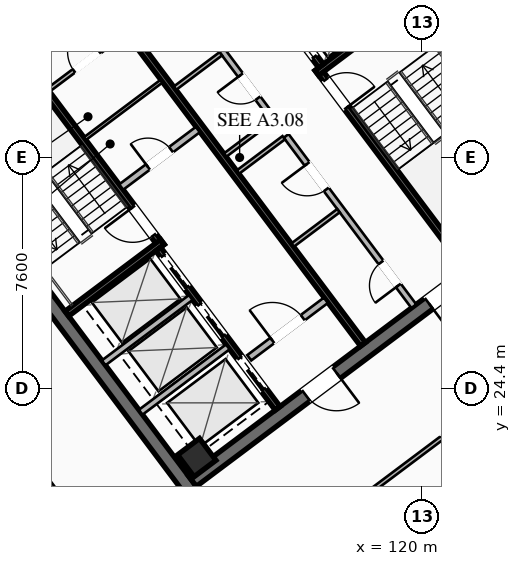
"""IFC4 building model, lengths in metres.
Left out: names, types, materials, properties, quantities, classifications, styles, units other than length and angle.
Written with IfcOpenShell. Run it as: python <this file> out.ifc"""

import sys

from ifc_helpers import new_model, si_unit, direction, frame, frame_2d, origin, origin_2d, place, context, subcontext, project, spatial, rectangle, hollow_rectangle, extrude, element, fill, save


model = new_model("IFC4")
c1 = context("Model", 3, precision=1e-05, world=origin(), true_north=direction((0.0, 1.0)))
c2 = subcontext(c1, "Body", "Model", "MODEL_VIEW")
j1 = project(units=[si_unit("LENGTHUNIT", "METRE"), si_unit("PLANEANGLEUNIT", "RADIAN")], contexts=[c1])
p1 = place(None, origin())
s1 = spatial("IfcSite", under=j1, at=p1, CompositionType="ELEMENT")
p2 = place(p1, origin())
s2 = spatial("IfcBuilding", under=s1, at=p2, CompositionType="ELEMENT")
p3 = place(p2, frame((0.0, 0.0, 229.05)))
s3 = spatial("IfcBuildingStorey", under=s2, at=p3, CompositionType="ELEMENT", Elevation=229.05)
for number, where, z_axis, x_axis in (
    (1, (112.396, 21.047, 0.0), (0.0, 0.0, 1.0), (-0.6, 0.8, 0.0)),
    (2, (115.604, 42.953, 0.0), (0.0, 0.0, 1.0), (0.6, -0.8, 0.0)),
):
    element("IfcWall", number, at=place(p3, frame(where, z_axis=z_axis, x_axis=x_axis)), inside=s3, PredefinedType="SHEAR", context=c2, shape_type="SweptSolid", body=[
        extrude(rectangle(XDim=15.6, YDim=0.45, at=frame_2d((7.8, 0.0))), origin(), (0.0, 0.0, 1.0), 3.55),
    ])
p4 = place(p3, frame((124.649, 30.518, 0.0), z_axis=(0.0, 0.0, 1.0), x_axis=(-0.8, -0.6, 0.0)))
e3 = element("IfcWall", 3, at=p4, inside=s3, PredefinedType="SHEAR", context=c2, shape_type="SweptSolid", body=[
    extrude(rectangle(XDim=15.26, YDim=0.45, at=frame_2d((7.63, 0.0))), origin(), (0.0, 0.0, 1.0), 3.55),
])
p5 = place(p4, frame((9.33, 0.0, 0.0)))
e4 = element("IfcOpeningElement", 4, at=p5, cuts=e3, PredefinedType="OPENING", context=c2, shape_type="SweptSolid", body=[
    extrude(rectangle(XDim=1.25, YDim=2.25, at=frame_2d((0.625, 1.125))), frame((0.0, 0.235, 0.0), z_axis=(0.0, -1.0, 0.0), x_axis=(1.0, 0.0, 0.0)), (0.0, 0.0, 1.0), 0.47),
])
p6 = place(p4, frame((4.28, 0.0, 0.0)))
e5 = element("IfcOpeningElement", 5, at=p6, cuts=e3, PredefinedType="OPENING", context=c2, shape_type="SweptSolid", body=[
    extrude(rectangle(XDim=1.25, YDim=2.25, at=frame_2d((0.625, 1.125))), frame((0.0, 0.235, 0.0), z_axis=(0.0, -1.0, 0.0), x_axis=(1.0, 0.0, 0.0)), (0.0, 0.0, 1.0), 0.47),
])
p7 = place(p3, frame((103.351, 33.482, 0.0), z_axis=(0.0, 0.0, 1.0), x_axis=(0.8, 0.6, 0.0)))
e6 = element("IfcWall", 6, at=p7, inside=s3, PredefinedType="SHEAR", context=c2, shape_type="SweptSolid", body=[
    extrude(rectangle(XDim=15.26, YDim=0.45, at=frame_2d((7.63, 0.0))), origin(), (0.0, 0.0, 1.0), 3.55),
])
p8 = place(p7, frame((4.68, 0.0, 0.0)))
e7 = element("IfcOpeningElement", 7, at=p8, cuts=e6, PredefinedType="OPENING", context=c2, shape_type="SweptSolid", body=[
    extrude(rectangle(XDim=1.25, YDim=2.25, at=frame_2d((0.625, 1.125))), frame((0.0, 0.235, 0.0), z_axis=(0.0, -1.0, 0.0), x_axis=(1.0, 0.0, 0.0)), (0.0, 0.0, 1.0), 0.47),
])
p9 = place(p7, frame((9.73, 0.0, 0.0)))
e8 = element("IfcOpeningElement", 8, at=p9, cuts=e6, PredefinedType="OPENING", context=c2, shape_type="SweptSolid", body=[
    extrude(rectangle(XDim=1.25, YDim=2.25, at=frame_2d((0.625, 1.125))), frame((0.0, 0.235, 0.0), z_axis=(0.0, -1.0, 0.0), x_axis=(1.0, 0.0, 0.0)), (0.0, 0.0, 1.0), 0.47),
])
p10 = place(p3, frame((112.59, 22.13, 0.0), z_axis=(0.0, 0.0, 1.0), x_axis=(0.799999996291, 0.600000004945, 0.0)))
e9 = element("IfcColumn", 9, at=p10, inside=s3, PredefinedType="COLUMN", context=c2, shape_type="SweptSolid", body=[
    extrude(hollow_rectangle(XDim=0.9, YDim=0.9, WallThickness=0.04, at=origin_2d()), origin(), (0.0, 0.0, 1.0), 3.37),
])
p11 = place(p3, frame((111.44, 29.08, 0.0), z_axis=(0.0, 0.0, 1.0), x_axis=(-0.59999041401, 0.800007189403, 0.0)))
e10 = element("IfcWall", 10, at=p11, inside=s3, PredefinedType="SHEAR", context=c2, shape_type="SweptSolid", body=[
    extrude(rectangle(XDim=8.15, YDim=0.2, at=frame_2d((4.075, 0.0))), origin(), (0.0, 0.0, 1.0), 3.37),
])
p12 = place(p11, frame((0.45, 0.0, 0.0)))
e11 = element("IfcOpeningElement", 11, at=p12, cuts=e10, PredefinedType="OPENING", context=c2, shape_type="SweptSolid", body=[
    extrude(rectangle(XDim=1.15, YDim=2.2, at=frame_2d((0.575, 1.1))), frame((0.0, 0.11, 0.0), z_axis=(0.0, -1.0, 0.0), x_axis=(1.0, 0.0, 0.0)), (0.0, 0.0, 1.0), 0.22),
])
p13 = place(p3, frame((108.316, 26.862, 0.0), z_axis=(0.0, 0.0, 1.0), x_axis=(0.800014909178, 0.599980120581, 0.0)))
e12 = element("IfcWall", 12, at=p13, inside=s3, PredefinedType="SHEAR", context=c2, shape_type="SweptSolid", body=[
    extrude(rectangle(XDim=3.93, YDim=0.2, at=frame_2d((1.965, 0.0))), origin(), (0.0, 0.0, 1.0), 3.37),
])
p14 = place(p3, frame((116.56, 34.92, 0.0), z_axis=(0.0, 0.0, 1.0), x_axis=(0.59999041401, -0.800007189403, 0.0)))
e13 = element("IfcWall", 13, at=p14, inside=s3, PredefinedType="SHEAR", context=c2, shape_type="SweptSolid", body=[
    extrude(rectangle(XDim=8.15, YDim=0.2, at=frame_2d((4.075, 0.0))), origin(), (0.0, 0.0, 1.0), 3.37),
])
p15 = place(p14, frame((0.45, 0.0, 0.0)))
e14 = element("IfcOpeningElement", 14, at=p15, cuts=e13, PredefinedType="OPENING", context=c2, shape_type="SweptSolid", body=[
    extrude(rectangle(XDim=1.15, YDim=2.2, at=frame_2d((0.575, 1.1))), frame((0.0, 0.11, 0.0), z_axis=(0.0, -1.0, 0.0), x_axis=(1.0, 0.0, 0.0)), (0.0, 0.0, 1.0), 0.22),
])
p16 = place(p3, frame((116.54, 34.78, 0.0), z_axis=(0.0, 0.0, 1.0), x_axis=(0.800014909178, 0.599980120581, 0.0)))
e15 = element("IfcWall", 15, at=p16, inside=s3, PredefinedType="SHEAR", context=c2, shape_type="SweptSolid", body=[
    extrude(rectangle(XDim=3.93, YDim=0.2, at=frame_2d((1.965, 0.0))), origin(), (0.0, 0.0, 1.0), 3.37),
])
p17 = place(p3, frame((118.058, 25.856, 0.0), z_axis=(0.0, 0.0, 1.0), x_axis=(-0.600002657301, 0.799998007018, 0.0)))
e16 = element("IfcWall", 16, at=p17, inside=s3, PredefinedType="SHEAR", context=c2, shape_type="SweptSolid", body=[
    extrude(rectangle(XDim=14.7, YDim=0.2, at=frame_2d((7.35, 0.0))), origin(), (0.0, 0.0, 1.0), 3.37),
])
p18 = place(p3, frame((110.104, 31.028, 0.0), z_axis=(0.0, 0.0, 1.0), x_axis=(0.800018601094, 0.59997519774, 0.0)))
e17 = element("IfcWall", 17, at=p18, inside=s3, PredefinedType="SOLIDWALL", context=c2, shape_type="SweptSolid", body=[
    extrude(rectangle(XDim=3.15, YDim=0.22, at=frame_2d((1.575, 0.0))), origin(), (0.0, 0.0, 1.0), 2.513),
])
p19 = place(p18, frame((1.1, 0.0, 0.0)))
e18 = element("IfcOpeningElement", 18, at=p19, cuts=e17, PredefinedType="OPENING", context=c2, shape_type="SweptSolid", body=[
    extrude(rectangle(XDim=0.95, YDim=2.05, at=frame_2d((0.475, 1.025))), frame((0.0, 0.12, 0.0), z_axis=(0.0, -1.0, 0.0), x_axis=(1.0, 0.0, 0.0)), (0.0, 0.0, 1.0), 0.24),
])
p20 = place(p3, frame((114.316, 25.412, 0.0), z_axis=(0.0, 0.0, 1.0), x_axis=(0.800018601094, 0.59997519774, 0.0)))
e19 = element("IfcWall", 19, at=p20, inside=s3, PredefinedType="SOLIDWALL", context=c2, shape_type="SweptSolid", body=[
    extrude(rectangle(XDim=3.15, YDim=0.22, at=frame_2d((1.575, 0.0))), origin(), (0.0, 0.0, 1.0), 2.513),
])
p21 = place(p20, frame((0.95, 0.0, 0.0)))
e20 = element("IfcOpeningElement", 20, at=p21, cuts=e19, PredefinedType="OPENING", context=c2, shape_type="SweptSolid", body=[
    extrude(rectangle(XDim=1.25, YDim=2.25, at=frame_2d((0.625, 1.125))), frame((0.0, 0.12, 0.0), z_axis=(0.0, -1.0, 0.0), x_axis=(1.0, 0.0, 0.0)), (0.0, 0.0, 1.0), 0.24),
])
p22 = place(p3, frame((115.25, 23.75, 0.0), z_axis=(0.0, 0.0, 1.0), x_axis=(-0.599994036198, 0.800004472816, 0.0)))
e21 = element("IfcWall", 21, at=p22, inside=s3, PredefinedType="SHEAR", context=c2, shape_type="SweptSolid", body=[
    extrude(rectangle(XDim=6.55, YDim=0.2, at=frame_2d((3.275, 0.0))), origin(), (0.0, 0.0, 1.0), 3.37),
])
p23 = place(p22, frame((4.975, 0.0, 0.0)))
e22 = element("IfcOpeningElement", 22, at=p23, cuts=e21, PredefinedType="OPENING", context=c2, shape_type="SweptSolid", body=[
    extrude(rectangle(XDim=1.3, YDim=2.25, at=frame_2d((0.65, 1.125))), frame((0.0, 0.11, 0.0), z_axis=(0.0, -1.0, 0.0), x_axis=(1.0, 0.0, 0.0)), (0.0, 0.0, 1.0), 0.22),
])
p24 = place(p22, frame((2.975, 0.0, 0.0)))
e23 = element("IfcOpeningElement", 23, at=p24, cuts=e21, PredefinedType="OPENING", context=c2, shape_type="SweptSolid", body=[
    extrude(rectangle(XDim=1.3, YDim=2.25, at=frame_2d((0.65, 1.125))), frame((0.0, 0.11, 0.0), z_axis=(0.0, -1.0, 0.0), x_axis=(1.0, 0.0, 0.0)), (0.0, 0.0, 1.0), 0.22),
])
p25 = place(p22, frame((0.775, 0.0, 0.0)))
e24 = element("IfcOpeningElement", 24, at=p25, cuts=e21, PredefinedType="OPENING", context=c2, shape_type="SweptSolid", body=[
    extrude(rectangle(XDim=1.3, YDim=2.25, at=frame_2d((0.65, 1.125))), frame((0.0, 0.11, 0.0), z_axis=(0.0, -1.0, 0.0), x_axis=(1.0, 0.0, 0.0)), (0.0, 0.0, 1.0), 0.22),
])
for number, where, z_axis, x_axis in (
    (25, (110.746, 23.622, 0.0), (0.0, 0.0, 1.0), (0.8, 0.6, 0.0)),
    (26, (109.528, 25.246, 0.0), (0.0, 0.0, 1.0), (0.8, 0.6, 0.0)),
):
    element("IfcWall", number, at=place(p3, frame(where, z_axis=z_axis, x_axis=x_axis)), inside=s3, PredefinedType="SOLIDWALL", context=c2, shape_type="SweptSolid", body=[
        extrude(rectangle(XDim=3.58, YDim=0.2, at=frame_2d((1.79, 0.0))), origin(), (0.0, 0.0, 1.0), 3.37),
    ])
p26 = place(p3, frame((112.75, 40.25, 0.0), z_axis=(0.0, 0.0, 1.0), x_axis=(0.599994036198, -0.800004472816, 0.0)))
e27 = element("IfcWall", 27, at=p26, inside=s3, PredefinedType="SHEAR", context=c2, shape_type="SweptSolid", body=[
    extrude(rectangle(XDim=6.55, YDim=0.2, at=frame_2d((3.275, 0.0))), origin(), (0.0, 0.0, 1.0), 3.37),
])
p27 = place(p26, frame((5.075, 0.0, 0.0)))
e28 = element("IfcOpeningElement", 28, at=p27, cuts=e27, PredefinedType="OPENING", context=c2, shape_type="SweptSolid", body=[
    extrude(rectangle(XDim=1.1, YDim=2.2, at=frame_2d((0.55, 1.1))), frame((0.0, 0.11, 0.0), z_axis=(0.0, -1.0, 0.0), x_axis=(1.0, 0.0, 0.0)), (0.0, 0.0, 1.0), 0.22),
])
p28 = place(p26, frame((3.025, 0.0, 0.0)))
e29 = element("IfcOpeningElement", 29, at=p28, cuts=e27, PredefinedType="OPENING", context=c2, shape_type="SweptSolid", body=[
    extrude(rectangle(XDim=1.1, YDim=2.2, at=frame_2d((0.55, 1.1))), frame((0.0, 0.11, 0.0), z_axis=(0.0, -1.0, 0.0), x_axis=(1.0, 0.0, 0.0)), (0.0, 0.0, 1.0), 0.22),
])
p29 = place(p26, frame((1.025, 0.0, 0.0)))
e30 = element("IfcOpeningElement", 30, at=p29, cuts=e27, PredefinedType="OPENING", context=c2, shape_type="SweptSolid", body=[
    extrude(rectangle(XDim=1.1, YDim=2.2, at=frame_2d((0.55, 1.1))), frame((0.0, 0.11, 0.0), z_axis=(0.0, -1.0, 0.0), x_axis=(1.0, 0.0, 0.0)), (0.0, 0.0, 1.0), 0.22),
])
p30 = place(p3, frame((107.71, 34.22, 0.0), z_axis=(0.0, 0.0, 1.0), x_axis=(0.799981399002, 0.60002480053, 0.0)))
e31 = element("IfcWall", 31, at=p30, inside=s3, PredefinedType="PARTITIONING", context=c2, shape_type="SweptSolid", body=[
    extrude(rectangle(XDim=3.15, YDim=0.135, at=frame_2d((1.575, 0.0))), origin(), (0.0, 0.0, 1.0), 2.513),
])
p31 = place(p30, frame((1.05, 0.0, 0.0)))
e32 = element("IfcOpeningElement", 32, at=p31, cuts=e31, PredefinedType="OPENING", context=c2, shape_type="SweptSolid", body=[
    extrude(rectangle(XDim=1.05, YDim=2.2, at=frame_2d((0.525, 1.1))), frame((0.0, 0.077, 0.0), z_axis=(0.0, -1.0, 0.0), x_axis=(1.0, 0.0, 0.0)), (0.0, 0.0, 1.0), 0.155),
])
p32 = place(p3, frame((108.91, 32.62, 0.0), z_axis=(0.0, 0.0, 1.0), x_axis=(0.800018601094, 0.59997519774, 0.0)))
e33 = element("IfcWall", 33, at=p32, inside=s3, PredefinedType="PARTITIONING", context=c2, shape_type="SweptSolid", body=[
    extrude(rectangle(XDim=3.15, YDim=0.11, at=frame_2d((1.575, 0.0))), origin(), (0.0, 0.0, 1.0), 2.513),
])
p33 = place(p3, frame((119.73, 27.11, 0.0), z_axis=(0.0, 0.0, 1.0), x_axis=(-0.600005580459, 0.799995814625, 0.0)))
e34 = element("IfcWall", 34, at=p33, inside=s3, PredefinedType="SOLIDWALL", context=c2, shape_type="SweptSolid", body=[
    extrude(rectangle(XDim=7.0, YDim=0.2, at=frame_2d((3.5, 0.0))), origin(), (0.0, 0.0, 1.0), 2.513),
])
p34 = place(p33, frame((0.85, 0.0, 0.0)))
e35 = element("IfcOpeningElement", 35, at=p34, cuts=e34, PredefinedType="OPENING", context=c2, shape_type="SweptSolid", body=[
    extrude(rectangle(XDim=0.95, YDim=2.05, at=frame_2d((0.475, 1.025))), frame((0.0, 0.11, 0.0), z_axis=(0.0, -1.0, 0.0), x_axis=(1.0, 0.0, 0.0)), (0.0, 0.0, 1.0), 0.22),
])
p35 = place(p33, frame((4.8, 0.0, 0.0)))
e36 = element("IfcOpeningElement", 36, at=p35, cuts=e34, PredefinedType="OPENING", context=c2, shape_type="SweptSolid", body=[
    extrude(rectangle(XDim=1.05, YDim=2.2, at=frame_2d((0.525, 1.1))), frame((0.0, 0.11, 0.0), z_axis=(0.0, -1.0, 0.0), x_axis=(1.0, 0.0, 0.0)), (0.0, 0.0, 1.0), 0.22),
])
for number, where, z_axis, x_axis in (
    (37, (113.946, 31.522, 0.0), (0.0, 0.0, 1.0), (0.8, 0.6, 0.0)),
    (38, (115.746, 29.122, 0.0), (0.0, 0.0, 1.0), (0.8, 0.6, 0.0)),
):
    element("IfcWall", number, at=place(p3, frame(where, z_axis=z_axis, x_axis=x_axis)), inside=s3, PredefinedType="PARTITIONING", context=c2, shape_type="SweptSolid", body=[
        extrude(rectangle(XDim=1.88, YDim=0.135, at=frame_2d((0.94, 0.0))), origin(), (0.0, 0.0, 1.0), 2.513),
    ])
p36 = place(p3, frame((115.11, 33.27, 0.0), z_axis=(0.0, 0.0, 1.0), x_axis=(-0.600011160345, 0.79999162962, 0.0)))
e39 = element("IfcWall", 39, at=p36, inside=s3, PredefinedType="SOLIDWALL", context=c2, shape_type="SweptSolid", body=[
    extrude(rectangle(XDim=7.0, YDim=0.2, at=frame_2d((3.5, 0.0))), origin(), (0.0, 0.0, 1.0), 2.513),
])
p37 = place(p36, frame((0.85, 0.0, 0.0)))
e40 = element("IfcOpeningElement", 40, at=p37, cuts=e39, PredefinedType="OPENING", context=c2, shape_type="SweptSolid", body=[
    extrude(rectangle(XDim=0.95, YDim=2.05, at=frame_2d((0.475, 1.025))), frame((0.0, 0.11, 0.0), z_axis=(0.0, -1.0, 0.0), x_axis=(1.0, 0.0, 0.0)), (0.0, 0.0, 1.0), 0.22),
])
p38 = place(p36, frame((4.85, 0.0, 0.0)))
e41 = element("IfcOpeningElement", 41, at=p38, cuts=e39, PredefinedType="OPENING", context=c2, shape_type="SweptSolid", body=[
    extrude(rectangle(XDim=0.95, YDim=2.05, at=frame_2d((0.475, 1.025))), frame((0.0, 0.11, 0.0), z_axis=(0.0, -1.0, 0.0), x_axis=(1.0, 0.0, 0.0)), (0.0, 0.0, 1.0), 0.22),
])
p39 = place(p3, frame((113.526, 32.082, 0.0), z_axis=(0.0, 0.0, 1.0), x_axis=(0.800046745961, 0.599937666993, 0.0)))
e42 = element("IfcWall", 42, at=p39, inside=s3, PredefinedType="PARTITIONING", context=c2, shape_type="SweptSolid", body=[
    extrude(rectangle(XDim=1.88, YDim=0.135, at=frame_2d((0.94, 0.0))), origin(), (0.0, 0.0, 1.0), 2.513),
])
p40 = place(p3, frame((111.876, 34.282, 0.0), z_axis=(0.0, 0.0, 1.0), x_axis=(0.8, 0.6, 0.0)))
e43 = element("IfcWall", 43, at=p40, inside=s3, PredefinedType="PARTITIONING", context=c2, shape_type="SweptSolid", body=[
    extrude(rectangle(XDim=1.88, YDim=0.135, at=frame_2d((0.94, 0.0))), origin(), (0.0, 0.0, 1.0), 2.513),
])
p41 = place(p3, frame((98.586, 33.502, 0.0), z_axis=(0.0, 0.0, 1.0), x_axis=(0.8, 0.6, 0.0)))
e44 = element("IfcWall", 44, at=p41, inside=s3, PredefinedType="PARTITIONING", context=c2, shape_type="SweptSolid", body=[
    extrude(rectangle(XDim=24.68, YDim=0.135, at=frame_2d((12.34, 0.0))), origin(), (0.0, 0.0, 1.0), 2.513),
])
p42 = place(p41, frame((7.05, 0.0, 0.0)))
e45 = element("IfcOpeningElement", 45, at=p42, cuts=e44, PredefinedType="OPENING", context=c2, shape_type="SweptSolid", body=[
    extrude(rectangle(XDim=0.95, YDim=2.05, at=frame_2d((0.475, 1.025))), frame((0.0, 0.077, 0.0), z_axis=(0.0, -1.0, 0.0), x_axis=(1.0, 0.0, 0.0)), (0.0, 0.0, 1.0), 0.155),
])
p43 = place(p41, frame((11.263, 0.0, 0.0)))
e46 = element("IfcOpeningElement", 46, at=p43, cuts=e44, PredefinedType="OPENING", context=c2, shape_type="SweptSolid", body=[
    extrude(rectangle(XDim=0.95, YDim=2.05, at=frame_2d((0.475, 1.025))), frame((0.0, 0.077, 0.0), z_axis=(0.0, -1.0, 0.0), x_axis=(1.0, 0.0, 0.0)), (0.0, 0.0, 1.0), 0.155),
])
p44 = place(p3, frame((124.342, 25.544, 0.0), z_axis=(0.0, 0.0, 1.0), x_axis=(-0.8, -0.6, 0.0)))
e47 = element("IfcWall", 47, at=p44, inside=s3, PredefinedType="PARTITIONING", context=c2, shape_type="SweptSolid", body=[
    extrude(rectangle(XDim=15.83, YDim=0.135, at=frame_2d((7.915, 0.0))), origin(), (0.0, 0.0, 1.0), 2.513),
])
p45 = place(p44, frame((3.658, 0.0, 0.0)))
e48 = element("IfcOpeningElement", 48, at=p45, cuts=e47, PredefinedType="OPENING", context=c2, shape_type="SweptSolid", body=[
    extrude(rectangle(XDim=0.95, YDim=2.05, at=frame_2d((0.475, 1.025))), frame((0.0, 0.077, 0.0), z_axis=(0.0, -1.0, 0.0), x_axis=(1.0, 0.0, 0.0)), (0.0, 0.0, 1.0), 0.155),
])
p46 = place(p3, frame((111.63, 16.11, 0.0), z_axis=(0.0, 0.0, 1.0), x_axis=(-0.599998196544, 0.800001352589, 0.0)))
e49 = element("IfcWall", 49, at=p46, inside=s3, PredefinedType="PARTITIONING", context=c2, shape_type="SweptSolid", body=[
    extrude(rectangle(XDim=21.66, YDim=0.135, at=frame_2d((10.83, 0.0))), origin(), (0.0, 0.0, 1.0), 2.513),
])
p47 = place(p46, frame((11.109, 0.0, 0.0)))
e50 = element("IfcOpeningElement", 50, at=p47, cuts=e49, PredefinedType="OPENING", context=c2, shape_type="SweptSolid", body=[
    extrude(rectangle(XDim=0.95, YDim=2.05, at=frame_2d((0.475, 1.025))), frame((0.0, 0.077, 0.0), z_axis=(0.0, -1.0, 0.0), x_axis=(1.0, 0.0, 0.0)), (0.0, 0.0, 1.0), 0.155),
])
p48 = place(p5, origin())
e51 = element("IfcDoor", 51, at=p48, inside=s3, OperationType="SINGLE_SWING_LEFT", PredefinedType="DOOR", context=c2, shape_type="SweptSolid", body=[
    extrude(rectangle(XDim=1.25, YDim=2.25, at=frame_2d((0.625, 1.125))), frame((0.0, 0.025, 0.0), z_axis=(0.0, -1.0, 0.0), x_axis=(1.0, 0.0, 0.0)), (0.0, 0.0, 1.0), 0.05),
])
fill(e4, e51)
p49 = place(p6, origin())
e52 = element("IfcDoor", 52, at=p49, inside=s3, OperationType="SINGLE_SWING_RIGHT", PredefinedType="DOOR", context=c2, shape_type="SweptSolid", body=[
    extrude(rectangle(XDim=1.25, YDim=2.25, at=frame_2d((0.625, 1.125))), frame((0.0, 0.025, 0.0), z_axis=(0.0, -1.0, 0.0), x_axis=(1.0, 0.0, 0.0)), (0.0, 0.0, 1.0), 0.05),
])
fill(e5, e52)
p50 = place(p12, origin())
e53 = element("IfcDoor", 53, at=p50, inside=s3, OperationType="SINGLE_SWING_RIGHT", PredefinedType="DOOR", context=c2, shape_type="SweptSolid", body=[
    extrude(rectangle(XDim=1.15, YDim=2.2, at=frame_2d((0.575, 1.1))), frame((0.0, 0.025, 0.0), z_axis=(0.0, -1.0, 0.0), x_axis=(1.0, 0.0, 0.0)), (0.0, 0.0, 1.0), 0.05),
])
fill(e11, e53)
p51 = place(p15, origin())
e54 = element("IfcDoor", 54, at=p51, inside=s3, OperationType="SINGLE_SWING_RIGHT", PredefinedType="DOOR", context=c2, shape_type="SweptSolid", body=[
    extrude(rectangle(XDim=1.15, YDim=2.2, at=frame_2d((0.575, 1.1))), frame((0.0, 0.025, 0.0), z_axis=(0.0, -1.0, 0.0), x_axis=(1.0, 0.0, 0.0)), (0.0, 0.0, 1.0), 0.05),
])
fill(e14, e54)
p52 = place(p21, origin())
e55 = element("IfcDoor", 55, at=p52, inside=s3, OperationType="SINGLE_SWING_LEFT", PredefinedType="DOOR", context=c2, shape_type="SweptSolid", body=[
    extrude(rectangle(XDim=1.25, YDim=2.25, at=frame_2d((0.625, 1.125))), frame((0.0, 0.025, 0.0), z_axis=(0.0, -1.0, 0.0), x_axis=(1.0, 0.0, 0.0)), (0.0, 0.0, 1.0), 0.05),
])
fill(e20, e55)
p53 = place(p31, origin())
e56 = element("IfcDoor", 56, at=p53, inside=s3, OperationType="SINGLE_SWING_RIGHT", PredefinedType="DOOR", context=c2, shape_type="SweptSolid", body=[
    extrude(rectangle(XDim=1.05, YDim=2.2, at=frame_2d((0.525, 1.1))), frame((0.0, 0.025, 0.0), z_axis=(0.0, -1.0, 0.0), x_axis=(1.0, 0.0, 0.0)), (0.0, 0.0, 1.0), 0.05),
])
fill(e32, e56)
p54 = place(p19, origin())
e57 = element("IfcDoor", 57, at=p54, inside=s3, OperationType="SINGLE_SWING_LEFT", PredefinedType="DOOR", context=c2, shape_type="SweptSolid", body=[
    extrude(rectangle(XDim=0.95, YDim=2.05, at=frame_2d((0.475, 1.025))), frame((0.0, 0.025, 0.0), z_axis=(0.0, -1.0, 0.0), x_axis=(1.0, 0.0, 0.0)), (0.0, 0.0, 1.0), 0.05),
])
fill(e18, e57)
p55 = place(p34, origin())
e58 = element("IfcDoor", 58, at=p55, inside=s3, OperationType="SINGLE_SWING_LEFT", PredefinedType="DOOR", context=c2, shape_type="SweptSolid", body=[
    extrude(rectangle(XDim=0.95, YDim=2.05, at=frame_2d((0.475, 1.025))), frame((0.0, 0.025, 0.0), z_axis=(0.0, -1.0, 0.0), x_axis=(1.0, 0.0, 0.0)), (0.0, 0.0, 1.0), 0.05),
])
fill(e35, e58)
p56 = place(p35, origin())
e59 = element("IfcDoor", 59, at=p56, inside=s3, OperationType="SINGLE_SWING_RIGHT", PredefinedType="DOOR", context=c2, shape_type="SweptSolid", body=[
    extrude(rectangle(XDim=1.05, YDim=2.2, at=frame_2d((0.525, 1.1))), frame((0.0, 0.025, 0.0), z_axis=(0.0, -1.0, 0.0), x_axis=(1.0, 0.0, 0.0)), (0.0, 0.0, 1.0), 0.05),
])
fill(e36, e59)
p57 = place(p37, origin())
e60 = element("IfcDoor", 60, at=p57, inside=s3, OperationType="SINGLE_SWING_RIGHT", PredefinedType="DOOR", context=c2, shape_type="SweptSolid", body=[
    extrude(rectangle(XDim=0.95, YDim=2.05, at=frame_2d((0.475, 1.025))), frame((0.0, 0.025, 0.0), z_axis=(0.0, -1.0, 0.0), x_axis=(1.0, 0.0, 0.0)), (0.0, 0.0, 1.0), 0.05),
])
fill(e40, e60)
p58 = place(p45, origin())
e61 = element("IfcDoor", 61, at=p58, inside=s3, OperationType="SINGLE_SWING_RIGHT", PredefinedType="DOOR", context=c2, shape_type="SweptSolid", body=[
    extrude(rectangle(XDim=0.95, YDim=2.05, at=frame_2d((0.475, 1.025))), frame((0.0, 0.025, 0.0), z_axis=(0.0, -1.0, 0.0), x_axis=(1.0, 0.0, 0.0)), (0.0, 0.0, 1.0), 0.05),
])
fill(e48, e61)
p59 = place(p23, origin())
e62 = element("IfcDoor", 62, at=p59, inside=s3, OperationType="SLIDING_TO_LEFT", PredefinedType="DOOR", context=c2, shape_type="SweptSolid", body=[
    extrude(rectangle(XDim=1.3, YDim=2.25, at=frame_2d((0.65, 1.125))), frame((0.0, 0.025, 0.0), z_axis=(0.0, -1.0, 0.0), x_axis=(1.0, 0.0, 0.0)), (0.0, 0.0, 1.0), 0.05),
])
fill(e22, e62)
p60 = place(p24, origin())
e63 = element("IfcDoor", 63, at=p60, inside=s3, OperationType="SLIDING_TO_LEFT", PredefinedType="DOOR", context=c2, shape_type="SweptSolid", body=[
    extrude(rectangle(XDim=1.3, YDim=2.25, at=frame_2d((0.65, 1.125))), frame((0.0, 0.025, 0.0), z_axis=(0.0, -1.0, 0.0), x_axis=(1.0, 0.0, 0.0)), (0.0, 0.0, 1.0), 0.05),
])
fill(e23, e63)
p61 = place(p25, origin())
e64 = element("IfcDoor", 64, at=p61, inside=s3, OperationType="SLIDING_TO_LEFT", PredefinedType="DOOR", context=c2, shape_type="SweptSolid", body=[
    extrude(rectangle(XDim=1.3, YDim=2.25, at=frame_2d((0.65, 1.125))), frame((0.0, 0.025, 0.0), z_axis=(0.0, -1.0, 0.0), x_axis=(1.0, 0.0, 0.0)), (0.0, 0.0, 1.0), 0.05),
])
fill(e24, e64)
p62 = place(p27, origin())
e65 = element("IfcDoor", 65, at=p62, inside=s3, OperationType="SLIDING_TO_LEFT", PredefinedType="DOOR", context=c2, shape_type="SweptSolid", body=[
    extrude(rectangle(XDim=1.1, YDim=2.2, at=frame_2d((0.55, 1.1))), frame((0.0, 0.025, 0.0), z_axis=(0.0, -1.0, 0.0), x_axis=(1.0, 0.0, 0.0)), (0.0, 0.0, 1.0), 0.05),
])
fill(e28, e65)
save(model, sys.argv[1])
